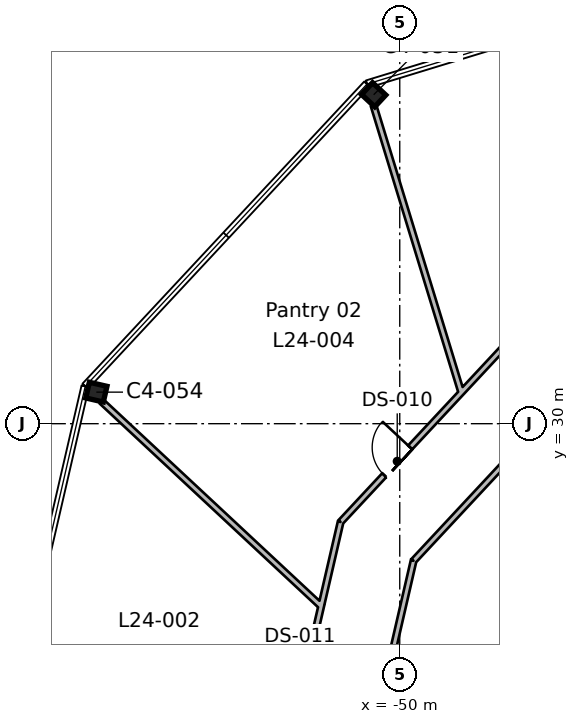
"""IFC4 building model, lengths in metres.
Left out: names, types, materials, properties, quantities, classifications, styles, units other than length and angle.
Written with IfcOpenShell. Run it as: python <this file> out.ifc"""

import sys

from ifc_helpers import new_model, si_unit, direction, frame, frame_2d, origin, origin_2d, place, context, subcontext, project, spatial, rectangle, i_section, extrude, element, fill, save


model = new_model("IFC4")
c1 = context("Model", 3, precision=1e-05, world=origin(), true_north=direction((0.0, 1.0)))
c2 = subcontext(c1, "Body", "Model", "MODEL_VIEW")
j1 = project(units=[si_unit("LENGTHUNIT", "METRE"), si_unit("PLANEANGLEUNIT", "RADIAN")], contexts=[c1])
p1 = place(None, origin())
s1 = spatial("IfcSite", under=j1, at=p1, CompositionType="ELEMENT")
p2 = place(p1, origin())
s2 = spatial("IfcBuilding", under=s1, at=p2, CompositionType="ELEMENT")
p3 = place(p2, frame((0.0, 0.0, 122.2)))
s3 = spatial("IfcBuildingStorey", under=s2, at=p3, CompositionType="ELEMENT", Elevation=122.2)
for number, where, z_axis, x_axis in (
    (1, (-57.983, 30.83, 0.0), (0.0, 0.0, 1.0), (-0.225, -0.974, 0.0)),
    (2, (-50.686, 38.655, 0.0), (0.0, 0.0, 1.0), (-0.682, -0.731, 0.0)),
):
    element("IfcColumn", number, at=place(p3, frame(where, z_axis=z_axis, x_axis=x_axis)), inside=s3, PredefinedType="COLUMN", context=c2, shape_type="SweptSolid", body=[
        extrude(i_section(OverallWidth=0.424, OverallDepth=0.475, WebThickness=0.048, FlangeThickness=0.077, FilletRadius=0.015, at=origin_2d()), origin(), (0.0, 0.0, 1.0), 4.0),
    ])
p4 = place(p3, frame((-57.841, 30.58, 0.0), z_axis=(0.0, 0.0, 1.0), x_axis=(0.731373012185, -0.681977651428, 0.0)))
e3 = element("IfcWall", 3, at=p4, inside=s3, PredefinedType="PARTITIONING", context=c2, shape_type="SweptSolid", body=[
    extrude(rectangle(XDim=7.893, YDim=0.15, at=frame_2d((3.947, 0.0))), origin(), (0.0, 0.0, 1.0), 3.64),
])
p5 = place(p3, frame((-52.056, 25.246, 0.0), z_axis=(0.0, 0.0, 1.0), x_axis=(-0.224961765576, -0.97436759184, 0.0)))
e4 = element("IfcWall", 4, at=p5, inside=s3, PredefinedType="PARTITIONING", context=c2, shape_type="SweptSolid", body=[
    extrude(rectangle(XDim=4.708, YDim=0.15, at=frame_2d((2.354, 0.0))), origin(), (0.0, 0.0, 1.0), 3.64),
])
p6 = place(p5, frame((2.024, 0.0, 0.0)))
e5 = element("IfcOpeningElement", 5, at=p6, cuts=e4, PredefinedType="OPENING", context=c2, shape_type="SweptSolid", body=[
    extrude(rectangle(XDim=1.0, YDim=2.1, at=frame_2d((0.5, 1.05))), frame((0.0, 0.085, 0.0), z_axis=(0.0, -1.0, 0.0), x_axis=(1.0, 0.0, 0.0)), (0.0, 0.0, 1.0), 0.17),
])
p7 = place(p3, frame((-48.345, 30.856, 0.0), z_axis=(0.0, 0.0, 1.0), x_axis=(-0.682044743799, -0.731310445335, 0.0)))
e6 = element("IfcWall", 6, at=p7, inside=s3, PredefinedType="PARTITIONING", context=c2, shape_type="SweptSolid", body=[
    extrude(rectangle(XDim=4.708, YDim=0.15, at=frame_2d((2.354, 0.0))), origin(), (0.0, 0.0, 1.0), 3.64),
])
p8 = place(p7, frame((2.024, 0.0, 0.0)))
e7 = element("IfcOpeningElement", 7, at=p8, cuts=e6, PredefinedType="OPENING", context=c2, shape_type="SweptSolid", body=[
    extrude(rectangle(XDim=1.0, YDim=2.1, at=frame_2d((0.5, 1.05))), frame((0.0, 0.085, 0.0), z_axis=(0.0, -1.0, 0.0), x_axis=(1.0, 0.0, 0.0)), (0.0, 0.0, 1.0), 0.17),
])
p9 = place(p3, frame((-51.556, 27.413, 0.0), z_axis=(0.0, 0.0, 1.0), x_axis=(-0.225019992363, -0.974354146621, 0.0)))
e8 = element("IfcWall", 8, at=p9, inside=s3, PredefinedType="PARTITIONING", context=c2, shape_type="SweptSolid", body=[
    extrude(rectangle(XDim=2.222, YDim=0.15, at=frame_2d((1.111, 0.0))), origin(), (0.0, 0.0, 1.0), 3.64),
])
p10 = place(p3, frame((-50.688, 38.366, 0.0), z_axis=(0.0, 0.0, 1.0), x_axis=(0.292463739097, -0.956276613388, 0.0)))
e9 = element("IfcWall", 9, at=p10, inside=s3, PredefinedType="PARTITIONING", context=c2, shape_type="SweptSolid", body=[
    extrude(rectangle(XDim=7.892, YDim=0.15, at=frame_2d((3.946, 0.0))), origin(), (0.0, 0.0, 1.0), 3.64),
])
p11 = place(p3, frame((-46.829, 32.482, 0.0), z_axis=(0.0, 0.0, 1.0), x_axis=(-0.681891349178, -0.731453476249, 0.0)))
e10 = element("IfcWall", 10, at=p11, inside=s3, PredefinedType="PARTITIONING", context=c2, shape_type="SweptSolid", body=[
    extrude(rectangle(XDim=2.222, YDim=0.15, at=frame_2d((1.111, 0.0))), origin(), (0.0, 0.0, 1.0), 3.64),
])
p12 = place(p3, frame((-50.942, 20.735, 0.0), z_axis=(0.0, 0.0, 1.0), x_axis=(0.224933214218, 0.974374183331, 0.0)))
e11 = element("IfcWall", 11, at=p12, inside=s3, PredefinedType="PARTITIONING", context=c2, shape_type="SweptSolid", body=[
    extrude(rectangle(XDim=5.806, YDim=0.15, at=frame_2d((2.903, 0.0))), origin(), (0.0, 0.0, 1.0), 3.64),
])
p13 = place(p3, frame((-49.636, 26.392, 0.0), z_axis=(0.0, 0.0, 1.0), x_axis=(0.681967545176, 0.731382435752, 0.0)))
e12 = element("IfcWall", 12, at=p13, inside=s3, PredefinedType="PARTITIONING", context=c2, shape_type="SweptSolid", body=[
    extrude(rectangle(XDim=5.805, YDim=0.15, at=frame_2d((2.903, 0.0))), origin(), (0.0, 0.0, 1.0), 3.64),
])
p14 = place(p8, frame((1.0, 0.0, 0.0), z_axis=(0.0, 0.0, 1.0), x_axis=(-1.0, 0.0, 0.0)))
e13 = element("IfcDoor", 13, at=p14, inside=s3, OperationType="SINGLE_SWING_RIGHT", PredefinedType="DOOR", context=c2, shape_type="SweptSolid", body=[
    extrude(rectangle(XDim=1.0, YDim=2.1, at=frame_2d((0.5, 1.05))), frame((0.0, 0.025, 0.0), z_axis=(0.0, -1.0, 0.0), x_axis=(1.0, 0.0, 0.0)), (0.0, 0.0, 1.0), 0.05),
])
fill(e7, e13)
save(model, sys.argv[1])
